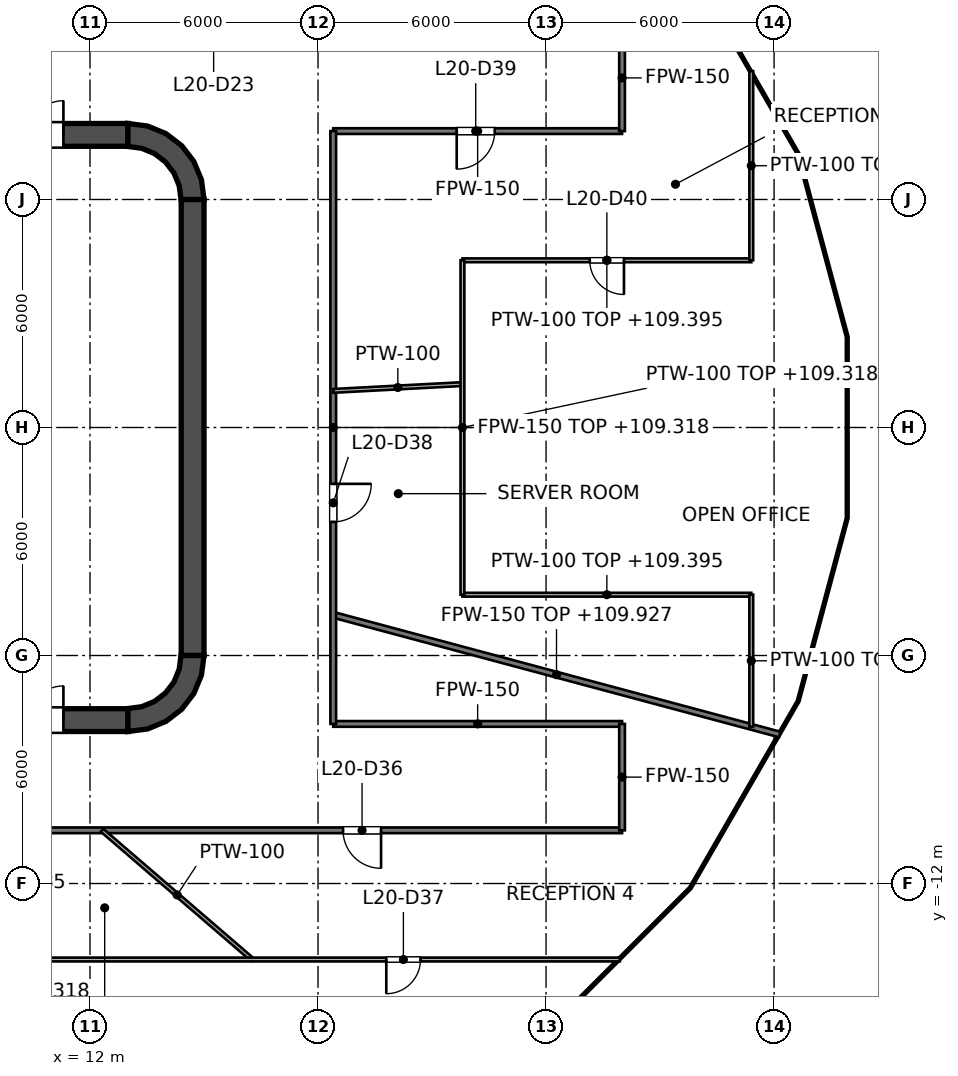
"""IFC4 building model, lengths in metres.
Left out: names, types, materials, properties, quantities, classifications, styles, units other than length and angle.
Written with IfcOpenShell. Run it as: python <this file> out.ifc"""

import sys

from ifc_helpers import new_model, si_unit, direction, frame, frame_2d, origin, place, context, subcontext, project, spatial, polyline, rectangle, outline, extrude, element, fill, save


model = new_model("IFC4")
c1 = context("Model", 3, precision=1e-05, world=origin(), true_north=direction((0.0, 1.0)))
c2 = subcontext(c1, "Body", "Model", "MODEL_VIEW")
j1 = project(units=[si_unit("LENGTHUNIT", "METRE"), si_unit("PLANEANGLEUNIT", "RADIAN")], contexts=[c1])
p1 = place(None, origin())
s1 = spatial("IfcSite", under=j1, at=p1, CompositionType="ELEMENT")
p2 = place(p1, origin())
s2 = spatial("IfcBuilding", under=s1, at=p2, CompositionType="ELEMENT")
p3 = place(p2, frame((0.0, 0.0, 106.2)))
s3 = spatial("IfcBuildingStorey", under=s2, at=p3, CompositionType="ELEMENT", Elevation=106.2)
p4 = place(p3, frame((-13.0, 7.7, 0.0), z_axis=(0.0, 0.0, 1.0), x_axis=(1.0, 0.0, 0.0)))
e1 = element("IfcWall", 1, at=p4, inside=s3, PredefinedType="SHEAR", context=c2, shape_type="SweptSolid", body=[
    extrude(rectangle(XDim=26.0, YDim=0.6, at=frame_2d((13.0, 0.0))), origin(), (0.0, 0.0, 1.0), 4.2),
])
p5 = place(p4, frame((1.7, 0.0, 0.0)))
e2 = element("IfcOpeningElement", 2, at=p5, cuts=e1, PredefinedType="OPENING", context=c2, shape_type="SweptSolid", body=[
    extrude(rectangle(XDim=1.8, YDim=2.1, at=frame_2d((0.9, 1.05))), frame((0.0, 0.3, 0.0), z_axis=(0.0, -1.0, 0.0), x_axis=(1.0, 0.0, 0.0)), (0.0, 0.0, 1.0), 0.6),
])
p6 = place(p4, frame((22.5, 0.0, 0.0)))
e3 = element("IfcOpeningElement", 3, at=p6, cuts=e1, PredefinedType="OPENING", context=c2, shape_type="SweptSolid", body=[
    extrude(rectangle(XDim=1.8, YDim=2.1, at=frame_2d((0.9, 1.05))), frame((0.0, 0.3, 0.0), z_axis=(0.0, -1.0, 0.0), x_axis=(1.0, 0.0, 0.0)), (0.0, 0.0, 1.0), 0.6),
])
p7 = place(p3, frame((-13.0, -7.7, 0.0), z_axis=(0.0, 0.0, 1.0), x_axis=(1.0, 0.0, 0.0)))
e4 = element("IfcWall", 4, at=p7, inside=s3, PredefinedType="SHEAR", context=c2, shape_type="SweptSolid", body=[
    extrude(rectangle(XDim=26.0, YDim=0.6, at=frame_2d((13.0, 0.0))), origin(), (0.0, 0.0, 1.0), 4.2),
])
p8 = place(p7, frame((1.7, 0.0, 0.0)))
e5 = element("IfcOpeningElement", 5, at=p8, cuts=e4, PredefinedType="OPENING", context=c2, shape_type="SweptSolid", body=[
    extrude(rectangle(XDim=1.8, YDim=2.1, at=frame_2d((0.9, 1.05))), frame((0.0, 0.3, 0.0), z_axis=(0.0, -1.0, 0.0), x_axis=(1.0, 0.0, 0.0)), (0.0, 0.0, 1.0), 0.6),
])
p9 = place(p7, frame((22.5, 0.0, 0.0)))
e6 = element("IfcOpeningElement", 6, at=p9, cuts=e4, PredefinedType="OPENING", context=c2, shape_type="SweptSolid", body=[
    extrude(rectangle(XDim=1.8, YDim=2.1, at=frame_2d((0.9, 1.05))), frame((0.0, 0.3, 0.0), z_axis=(0.0, -1.0, 0.0), x_axis=(1.0, 0.0, 0.0)), (0.0, 0.0, 1.0), 0.6),
])
p10 = place(p3, frame((14.7, -6.0, 0.0), z_axis=(0.0, 0.0, 1.0), x_axis=(0.0, 1.0, 0.0)))
e7 = element("IfcWall", 7, at=p10, inside=s3, PredefinedType="SHEAR", context=c2, shape_type="SweptSolid", body=[
    extrude(rectangle(XDim=12.0, YDim=0.6, at=frame_2d((6.0, 0.0))), origin(), (0.0, 0.0, 1.0), 4.2),
])
p11 = place(p3, origin())
e8 = element("IfcWall", 8, at=p11, inside=s3, PredefinedType="SHEAR", context=c2, shape_type="SweptSolid", body=[
    extrude(outline(polyline([(13.0, 8.0), (13.0, 7.395), (13.361, 7.347), (13.698, 7.208), (13.986, 6.986), (14.208, 6.698), (14.347, 6.361), (14.395, 6.0), (15.0, 6.0), (14.932, 6.518), (14.732, 7.0), (14.414, 7.414), (14.0, 7.732), (13.518, 7.932), (13.0, 8.0)])), origin(), (0.0, 0.0, 1.0), 4.2),
])
e9 = element("IfcWall", 9, at=p11, inside=s3, PredefinedType="SHEAR", context=c2, shape_type="SweptSolid", body=[
    extrude(outline(polyline([(15.0, -6.0), (14.395, -6.0), (14.347, -6.361), (14.208, -6.698), (13.986, -6.986), (13.698, -7.208), (13.361, -7.347), (13.0, -7.395), (13.0, -8.0), (13.518, -7.932), (14.0, -7.732), (14.414, -7.414), (14.732, -7.0), (14.932, -6.518), (15.0, -6.0)])), origin(), (0.0, 0.0, 1.0), 4.2),
])
p12 = place(p3, frame((11.8, -7.4, 0.0), z_axis=(0.0, 0.0, 1.0), x_axis=(0.0, 1.0, 0.0)))
e10 = element("IfcWall", 10, at=p12, inside=s3, PredefinedType="SOLIDWALL", context=c2, shape_type="SweptSolid", body=[
    extrude(rectangle(XDim=14.8, YDim=0.4, at=frame_2d((7.4, 0.0))), origin(), (0.0, 0.0, 1.0), 4.05),
])
p13 = place(p12, frame((11.2, 0.0, 0.0)))
e11 = element("IfcOpeningElement", 11, at=p13, cuts=e10, PredefinedType="OPENING", context=c2, shape_type="SweptSolid", body=[
    extrude(rectangle(XDim=1.1, YDim=2.1, at=frame_2d((0.55, 1.05))), frame((0.0, 0.2, 0.0), z_axis=(0.0, -1.0, 0.0), x_axis=(1.0, 0.0, 0.0)), (0.0, 0.0, 1.0), 0.4),
])
p14 = place(p12, frame((8.3, 0.0, 0.0)))
e12 = element("IfcOpeningElement", 12, at=p14, cuts=e10, PredefinedType="OPENING", context=c2, shape_type="SweptSolid", body=[
    extrude(rectangle(XDim=1.1, YDim=2.1, at=frame_2d((0.55, 1.05))), frame((0.0, 0.2, 0.0), z_axis=(0.0, -1.0, 0.0), x_axis=(1.0, 0.0, 0.0)), (0.0, 0.0, 1.0), 0.4),
])
p15 = place(p12, frame((5.4, 0.0, 0.0)))
e13 = element("IfcOpeningElement", 13, at=p15, cuts=e10, PredefinedType="OPENING", context=c2, shape_type="SweptSolid", body=[
    extrude(rectangle(XDim=1.1, YDim=2.1, at=frame_2d((0.55, 1.05))), frame((0.0, 0.2, 0.0), z_axis=(0.0, -1.0, 0.0), x_axis=(1.0, 0.0, 0.0)), (0.0, 0.0, 1.0), 0.4),
])
p16 = place(p12, frame((13.552, 0.0, 0.0)))
e14 = element("IfcOpeningElement", 14, at=p16, cuts=e10, PredefinedType="OPENING", context=c2, shape_type="SweptSolid", body=[
    extrude(rectangle(XDim=0.9, YDim=2.1, at=frame_2d((0.45, 1.05))), frame((0.0, 0.2, 0.0), z_axis=(0.0, -1.0, 0.0), x_axis=(1.0, 0.0, 0.0)), (0.0, 0.0, 1.0), 0.4),
])
p17 = place(p12, frame((0.347, 0.0, 0.0)))
e15 = element("IfcOpeningElement", 15, at=p17, cuts=e10, PredefinedType="OPENING", context=c2, shape_type="SweptSolid", body=[
    extrude(rectangle(XDim=0.9, YDim=2.1, at=frame_2d((0.45, 1.05))), frame((0.0, 0.2, 0.0), z_axis=(0.0, -1.0, 0.0), x_axis=(1.0, 0.0, 0.0)), (0.0, 0.0, 1.0), 0.4),
])
e16 = element("IfcWall", 16, at=p11, inside=s3, PredefinedType="SOLIDWALL", context=c2, shape_type="SweptSolid", body=[
    extrude(outline(polyline([(12.0, -5.675), (12.0, -5.925), (14.15, -5.925), (14.4, -5.925), (14.4, -5.675), (14.4, -3.025), (14.4, -2.775), (14.4, -0.125), (14.4, 0.125), (14.4, 2.775), (14.4, 3.025), (14.4, 5.675), (14.4, 5.925), (14.15, 5.925), (12.0, 5.925), (12.0, 5.675), (14.15, 5.675), (14.15, 3.025), (12.0, 3.025), (12.0, 2.775), (14.15, 2.775), (14.15, 0.125), (12.0, 0.125), (12.0, -0.125), (14.15, -0.125), (14.15, -2.775), (12.0, -2.775), (12.0, -3.025), (14.15, -3.025), (14.15, -5.675), (12.0, -5.675)])), origin(), (0.0, 0.0, 1.0), 4.05),
])
p18 = place(p3, frame((18.4, -4.93, 0.0), z_axis=(0.0, 0.0, 1.0), x_axis=(0.965910063501, -0.258877865465, 0.0)))
e17 = element("IfcWall", 17, at=p18, inside=s3, PredefinedType="PARTITIONING", context=c2, shape_type="SweptSolid", body=[
    extrude(rectangle(XDim=12.165, YDim=0.15, at=frame_2d((6.083, 0.0))), origin(), (0.0, 0.0, 1.0), 3.727),
])
p19 = place(p3, frame((-26.0, -10.6, 0.0), z_axis=(0.0, 0.0, 1.0), x_axis=(1.0, 0.0, 0.0)))
e18 = element("IfcWall", 18, at=p19, inside=s3, PredefinedType="PARTITIONING", context=c2, shape_type="SweptSolid", body=[
    extrude(rectangle(XDim=52.0, YDim=0.15, at=frame_2d((26.0, 0.0))), origin(), (0.0, 0.0, 1.0), 3.118),
])
p20 = place(p19, frame((9.34, 0.0, 0.0)))
e19 = element("IfcOpeningElement", 19, at=p20, cuts=e18, PredefinedType="OPENING", context=c2, shape_type="SweptSolid", body=[
    extrude(rectangle(XDim=1.2, YDim=2.1, at=frame_2d((0.6, 1.05))), frame((0.0, 0.075, 0.0), z_axis=(0.0, -1.0, 0.0), x_axis=(1.0, 0.0, 0.0)), (0.0, 0.0, 1.0), 0.15),
])
p21 = place(p19, frame((21.313, 0.0, 0.0)))
e20 = element("IfcOpeningElement", 20, at=p21, cuts=e18, PredefinedType="OPENING", context=c2, shape_type="SweptSolid", body=[
    extrude(rectangle(XDim=1.0, YDim=2.1, at=frame_2d((0.5, 1.05))), frame((0.0, 0.075, 0.0), z_axis=(0.0, -1.0, 0.0), x_axis=(1.0, 0.0, 0.0)), (0.0, 0.0, 1.0), 0.15),
])
p22 = place(p19, frame((25.793, 0.0, 0.0)))
e21 = element("IfcOpeningElement", 21, at=p22, cuts=e18, PredefinedType="OPENING", context=c2, shape_type="SweptSolid", body=[
    extrude(rectangle(XDim=1.0, YDim=2.1, at=frame_2d((0.5, 1.05))), frame((0.0, 0.075, 0.0), z_axis=(0.0, -1.0, 0.0), x_axis=(1.0, 0.0, 0.0)), (0.0, 0.0, 1.0), 0.15),
])
p23 = place(p19, frame((30.25, 0.0, 0.0)))
e22 = element("IfcOpeningElement", 22, at=p23, cuts=e18, PredefinedType="OPENING", context=c2, shape_type="SweptSolid", body=[
    extrude(rectangle(XDim=1.0, YDim=2.1, at=frame_2d((0.5, 1.05))), frame((0.0, 0.075, 0.0), z_axis=(0.0, -1.0, 0.0), x_axis=(1.0, 0.0, 0.0)), (0.0, 0.0, 1.0), 0.15),
])
p24 = place(p19, frame((34.989, 0.0, 0.0)))
e23 = element("IfcOpeningElement", 23, at=p24, cuts=e18, PredefinedType="OPENING", context=c2, shape_type="SweptSolid", body=[
    extrude(rectangle(XDim=1.0, YDim=2.1, at=frame_2d((0.5, 1.05))), frame((0.0, 0.075, 0.0), z_axis=(0.0, -1.0, 0.0), x_axis=(1.0, 0.0, 0.0)), (0.0, 0.0, 1.0), 0.15),
])
p25 = place(p19, frame((44.658, 0.0, 0.0)))
e24 = element("IfcOpeningElement", 24, at=p25, cuts=e18, PredefinedType="OPENING", context=c2, shape_type="SweptSolid", body=[
    extrude(rectangle(XDim=1.0, YDim=2.1, at=frame_2d((0.5, 1.05))), frame((0.0, 0.075, 0.0), z_axis=(0.0, -1.0, 0.0), x_axis=(1.0, 0.0, 0.0)), (0.0, 0.0, 1.0), 0.15),
])
p26 = place(p3, frame((18.4, -7.8, 0.0), z_axis=(0.0, 0.0, 1.0), x_axis=(1.0, 0.0, 0.0)))
e25 = element("IfcWall", 25, at=p26, inside=s3, PredefinedType="PARTITIONING", context=c2, shape_type="SweptSolid", body=[
    extrude(rectangle(XDim=7.6, YDim=0.15, at=frame_2d((3.8, 0.0))), origin(), (0.0, 0.0, 1.0), 3.276),
])
p27 = place(p3, frame((18.4, 7.8, 0.0), z_axis=(0.0, 0.0, 1.0), x_axis=(1.0, 0.0, 0.0)))
e26 = element("IfcWall", 26, at=p27, inside=s3, PredefinedType="PARTITIONING", context=c2, shape_type="SweptSolid", body=[
    extrude(rectangle(XDim=7.6, YDim=0.15, at=frame_2d((3.8, 0.0))), origin(), (0.0, 0.0, 1.0), 3.276),
])
p28 = place(p27, frame((3.249, 0.0, 0.0)))
e27 = element("IfcOpeningElement", 27, at=p28, cuts=e26, PredefinedType="OPENING", context=c2, shape_type="SweptSolid", body=[
    extrude(rectangle(XDim=1.0, YDim=2.1, at=frame_2d((0.5, 1.05))), frame((0.0, 0.075, 0.0), z_axis=(0.0, -1.0, 0.0), x_axis=(1.0, 0.0, 0.0)), (0.0, 0.0, 1.0), 0.15),
])
for number, where, z_axis, x_axis in (
    (28, (26.0, -10.6, 0.0), (0.0, 0.0, 1.0), (0.0, 1.0, 0.0)),
    (29, (26.0, 7.8, 0.0), (0.0, 0.0, 1.0), (0.0, 1.0, 0.0)),
):
    element("IfcWall", number, at=place(p3, frame(where, z_axis=z_axis, x_axis=x_axis)), inside=s3, PredefinedType="PARTITIONING", context=c2, shape_type="SweptSolid", body=[
        extrude(rectangle(XDim=2.8, YDim=0.15, at=frame_2d((1.4, 0.0))), origin(), (0.0, 0.0, 1.0), 3.276),
    ])
p29 = place(p3, frame((18.4, -7.8, 0.0), z_axis=(0.0, 0.0, 1.0), x_axis=(0.0, 1.0, 0.0)))
e30 = element("IfcWall", 30, at=p29, inside=s3, PredefinedType="PARTITIONING", context=c2, shape_type="SweptSolid", body=[
    extrude(rectangle(XDim=15.6, YDim=0.15, at=frame_2d((7.8, 0.0))), origin(), (0.0, 0.0, 1.0), 3.118),
])
p30 = place(p29, frame((5.317, 0.0, 0.0)))
e31 = element("IfcOpeningElement", 31, at=p30, cuts=e30, PredefinedType="OPENING", context=c2, shape_type="SweptSolid", body=[
    extrude(rectangle(XDim=1.0, YDim=2.1, at=frame_2d((0.5, 1.05))), frame((0.0, 0.075, 0.0), z_axis=(0.0, -1.0, 0.0), x_axis=(1.0, 0.0, 0.0)), (0.0, 0.0, 1.0), 0.15),
])
p31 = place(p3, frame((12.317, -10.6, 0.0), z_axis=(0.0, 0.0, 1.0), x_axis=(0.758005488553, -0.652248173109, 0.0)))
e32 = element("IfcWall", 32, at=p31, inside=s3, PredefinedType="PARTITIONING", context=c2, shape_type="SweptSolid", body=[
    extrude(rectangle(XDim=5.213, YDim=0.1, at=frame_2d((2.606, 0.0))), origin(), (0.0, 0.0, 1.0), 4.05),
])
p32 = place(p3, frame((-8.083, -14.0, 0.0), z_axis=(0.0, 0.0, 1.0), x_axis=(1.0, 0.0, 0.0)))
e33 = element("IfcWall", 33, at=p32, inside=s3, PredefinedType="PARTITIONING", context=c2, shape_type="SweptSolid", body=[
    extrude(rectangle(XDim=34.024, YDim=0.1, at=frame_2d((17.012, 0.0))), origin(), (0.0, 0.0, 1.0), 3.118),
])
p33 = place(p32, frame((7.52, 0.0, 0.0)))
e34 = element("IfcOpeningElement", 34, at=p33, cuts=e33, PredefinedType="OPENING", context=c2, shape_type="SweptSolid", body=[
    extrude(rectangle(XDim=1.8, YDim=2.1, at=frame_2d((0.9, 1.05))), frame((0.0, 0.05, 0.0), z_axis=(0.0, -1.0, 0.0), x_axis=(1.0, 0.0, 0.0)), (0.0, 0.0, 1.0), 0.1),
])
p34 = place(p32, frame((27.879, 0.0, 0.0)))
e35 = element("IfcOpeningElement", 35, at=p34, cuts=e33, PredefinedType="OPENING", context=c2, shape_type="SweptSolid", body=[
    extrude(rectangle(XDim=0.9, YDim=2.1, at=frame_2d((0.45, 1.05))), frame((0.0, 0.05, 0.0), z_axis=(0.0, -1.0, 0.0), x_axis=(1.0, 0.0, 0.0)), (0.0, 0.0, 1.0), 0.1),
])
p35 = place(p3, frame((21.8, -4.4, 0.0), z_axis=(0.0, 0.0, 1.0), x_axis=(1.0, 0.0, 0.0)))
e36 = element("IfcWall", 36, at=p35, inside=s3, PredefinedType="PARTITIONING", context=c2, shape_type="SweptSolid", body=[
    extrude(rectangle(XDim=7.6, YDim=0.1, at=frame_2d((3.8, 0.0))), origin(), (0.0, 0.0, 1.0), 3.195),
])
p36 = place(p3, frame((21.8, 4.4, 0.0), z_axis=(0.0, 0.0, 1.0), x_axis=(1.0, 0.0, 0.0)))
e37 = element("IfcWall", 37, at=p36, inside=s3, PredefinedType="PARTITIONING", context=c2, shape_type="SweptSolid", body=[
    extrude(rectangle(XDim=7.6, YDim=0.1, at=frame_2d((3.8, 0.0))), origin(), (0.0, 0.0, 1.0), 3.195),
])
p37 = place(p36, frame((3.35, 0.0, 0.0)))
e38 = element("IfcOpeningElement", 38, at=p37, cuts=e37, PredefinedType="OPENING", context=c2, shape_type="SweptSolid", body=[
    extrude(rectangle(XDim=0.9, YDim=2.1, at=frame_2d((0.45, 1.05))), frame((0.0, 0.05, 0.0), z_axis=(0.0, -1.0, 0.0), x_axis=(1.0, 0.0, 0.0)), (0.0, 0.0, 1.0), 0.1),
])
p38 = place(p3, frame((18.4, 0.964, 0.0), z_axis=(0.0, 0.0, 1.0), x_axis=(0.998632842418, 0.052272804058, 0.0)))
e39 = element("IfcWall", 39, at=p38, inside=s3, PredefinedType="PARTITIONING", context=c2, shape_type="SweptSolid", body=[
    extrude(rectangle(XDim=3.405, YDim=0.1, at=frame_2d((1.702, 0.0))), origin(), (0.0, 0.0, 1.0), 4.05),
])
p39 = place(p3, frame((29.4, -7.878, 0.0), z_axis=(0.0, 0.0, 1.0), x_axis=(0.0, 1.0, 0.0)))
e40 = element("IfcWall", 40, at=p39, inside=s3, PredefinedType="PARTITIONING", context=c2, shape_type="SweptSolid", body=[
    extrude(rectangle(XDim=3.478, YDim=0.1, at=frame_2d((1.739, 0.0))), origin(), (0.0, 0.0, 1.0), 3.127),
])
p40 = place(p3, frame((29.4, 4.4, 0.0), z_axis=(0.0, 0.0, 1.0), x_axis=(0.0, 1.0, 0.0)))
e41 = element("IfcWall", 41, at=p40, inside=s3, PredefinedType="PARTITIONING", context=c2, shape_type="SweptSolid", body=[
    extrude(rectangle(XDim=4.978, YDim=0.1, at=frame_2d((2.489, 0.0))), origin(), (0.0, 0.0, 1.0), 3.127),
])
p41 = place(p3, frame((21.8, -4.4, 0.0), z_axis=(0.0, 0.0, 1.0), x_axis=(0.0, 1.0, 0.0)))
e42 = element("IfcWall", 42, at=p41, inside=s3, PredefinedType="PARTITIONING", context=c2, shape_type="SweptSolid", body=[
    extrude(rectangle(XDim=8.8, YDim=0.1, at=frame_2d((4.4, 0.0))), origin(), (0.0, 0.0, 1.0), 3.118),
])
p42 = place(p13, origin())
e43 = element("IfcDoor", 43, at=p42, inside=s3, OperationType="DOUBLE_DOOR_SLIDING", PredefinedType="DOOR", context=c2, shape_type="SweptSolid", body=[
    extrude(rectangle(XDim=1.1, YDim=2.1, at=frame_2d((0.55, 1.05))), frame((0.0, 0.025, 0.0), z_axis=(0.0, -1.0, 0.0), x_axis=(1.0, 0.0, 0.0)), (0.0, 0.0, 1.0), 0.05),
])
fill(e11, e43)
p43 = place(p14, origin())
e44 = element("IfcDoor", 44, at=p43, inside=s3, OperationType="DOUBLE_DOOR_SLIDING", PredefinedType="DOOR", context=c2, shape_type="SweptSolid", body=[
    extrude(rectangle(XDim=1.1, YDim=2.1, at=frame_2d((0.55, 1.05))), frame((0.0, 0.025, 0.0), z_axis=(0.0, -1.0, 0.0), x_axis=(1.0, 0.0, 0.0)), (0.0, 0.0, 1.0), 0.05),
])
fill(e12, e44)
p44 = place(p15, origin())
e45 = element("IfcDoor", 45, at=p44, inside=s3, OperationType="DOUBLE_DOOR_SLIDING", PredefinedType="DOOR", context=c2, shape_type="SweptSolid", body=[
    extrude(rectangle(XDim=1.1, YDim=2.1, at=frame_2d((0.55, 1.05))), frame((0.0, 0.025, 0.0), z_axis=(0.0, -1.0, 0.0), x_axis=(1.0, 0.0, 0.0)), (0.0, 0.0, 1.0), 0.05),
])
fill(e13, e45)
p45 = place(p16, origin())
e46 = element("IfcDoor", 46, at=p45, inside=s3, OperationType="SINGLE_SWING_RIGHT", PredefinedType="DOOR", context=c2, shape_type="SweptSolid", body=[
    extrude(rectangle(XDim=0.9, YDim=2.1, at=frame_2d((0.45, 1.05))), frame((0.0, 0.025, 0.0), z_axis=(0.0, -1.0, 0.0), x_axis=(1.0, 0.0, 0.0)), (0.0, 0.0, 1.0), 0.05),
])
fill(e14, e46)
p46 = place(p17, origin())
e47 = element("IfcDoor", 47, at=p46, inside=s3, OperationType="SINGLE_SWING_RIGHT", PredefinedType="DOOR", context=c2, shape_type="SweptSolid", body=[
    extrude(rectangle(XDim=0.9, YDim=2.1, at=frame_2d((0.45, 1.05))), frame((0.0, 0.025, 0.0), z_axis=(0.0, -1.0, 0.0), x_axis=(1.0, 0.0, 0.0)), (0.0, 0.0, 1.0), 0.05),
])
fill(e15, e47)
p47 = place(p6, origin())
e48 = element("IfcDoor", 48, at=p47, inside=s3, OperationType="DOUBLE_DOOR_SINGLE_SWING", PredefinedType="DOOR", context=c2, shape_type="SweptSolid", body=[
    extrude(rectangle(XDim=1.8, YDim=2.1, at=frame_2d((0.9, 1.05))), frame((0.0, 0.025, 0.0), z_axis=(0.0, -1.0, 0.0), x_axis=(1.0, 0.0, 0.0)), (0.0, 0.0, 1.0), 0.05),
])
fill(e3, e48)
p48 = place(p9, origin())
e49 = element("IfcDoor", 49, at=p48, inside=s3, OperationType="DOUBLE_DOOR_SINGLE_SWING", PredefinedType="DOOR", context=c2, shape_type="SweptSolid", body=[
    extrude(rectangle(XDim=1.8, YDim=2.1, at=frame_2d((0.9, 1.05))), frame((0.0, 0.025, 0.0), z_axis=(0.0, -1.0, 0.0), x_axis=(1.0, 0.0, 0.0)), (0.0, 0.0, 1.0), 0.05),
])
fill(e6, e49)
p49 = place(p25, origin())
e50 = element("IfcDoor", 50, at=p49, inside=s3, OperationType="SINGLE_SWING_RIGHT", PredefinedType="DOOR", context=c2, shape_type="SweptSolid", body=[
    extrude(rectangle(XDim=1.0, YDim=2.1, at=frame_2d((0.5, 1.05))), frame((0.0, 0.025, 0.0), z_axis=(0.0, -1.0, 0.0), x_axis=(1.0, 0.0, 0.0)), (0.0, 0.0, 1.0), 0.05),
])
fill(e24, e50)
p50 = place(p34, origin())
e51 = element("IfcDoor", 51, at=p50, inside=s3, OperationType="SINGLE_SWING_LEFT", PredefinedType="DOOR", context=c2, shape_type="SweptSolid", body=[
    extrude(rectangle(XDim=0.9, YDim=2.1, at=frame_2d((0.45, 1.05))), frame((0.0, 0.025, 0.0), z_axis=(0.0, -1.0, 0.0), x_axis=(1.0, 0.0, 0.0)), (0.0, 0.0, 1.0), 0.05),
])
fill(e35, e51)
p51 = place(p30, origin())
e52 = element("IfcDoor", 52, at=p51, inside=s3, OperationType="SINGLE_SWING_RIGHT", PredefinedType="DOOR", context=c2, shape_type="SweptSolid", body=[
    extrude(rectangle(XDim=1.0, YDim=2.1, at=frame_2d((0.5, 1.05))), frame((0.0, 0.025, 0.0), z_axis=(0.0, -1.0, 0.0), x_axis=(1.0, 0.0, 0.0)), (0.0, 0.0, 1.0), 0.05),
])
fill(e31, e52)
p52 = place(p28, origin())
e53 = element("IfcDoor", 53, at=p52, inside=s3, OperationType="SINGLE_SWING_LEFT", PredefinedType="DOOR", context=c2, shape_type="SweptSolid", body=[
    extrude(rectangle(XDim=1.0, YDim=2.1, at=frame_2d((0.5, 1.05))), frame((0.0, 0.025, 0.0), z_axis=(0.0, -1.0, 0.0), x_axis=(1.0, 0.0, 0.0)), (0.0, 0.0, 1.0), 0.05),
])
fill(e27, e53)
p53 = place(p37, origin())
e54 = element("IfcDoor", 54, at=p53, inside=s3, OperationType="SINGLE_SWING_RIGHT", PredefinedType="DOOR", context=c2, shape_type="SweptSolid", body=[
    extrude(rectangle(XDim=0.9, YDim=2.1, at=frame_2d((0.45, 1.05))), frame((0.0, 0.025, 0.0), z_axis=(0.0, -1.0, 0.0), x_axis=(1.0, 0.0, 0.0)), (0.0, 0.0, 1.0), 0.05),
])
fill(e38, e54)
save(model, sys.argv[1])
